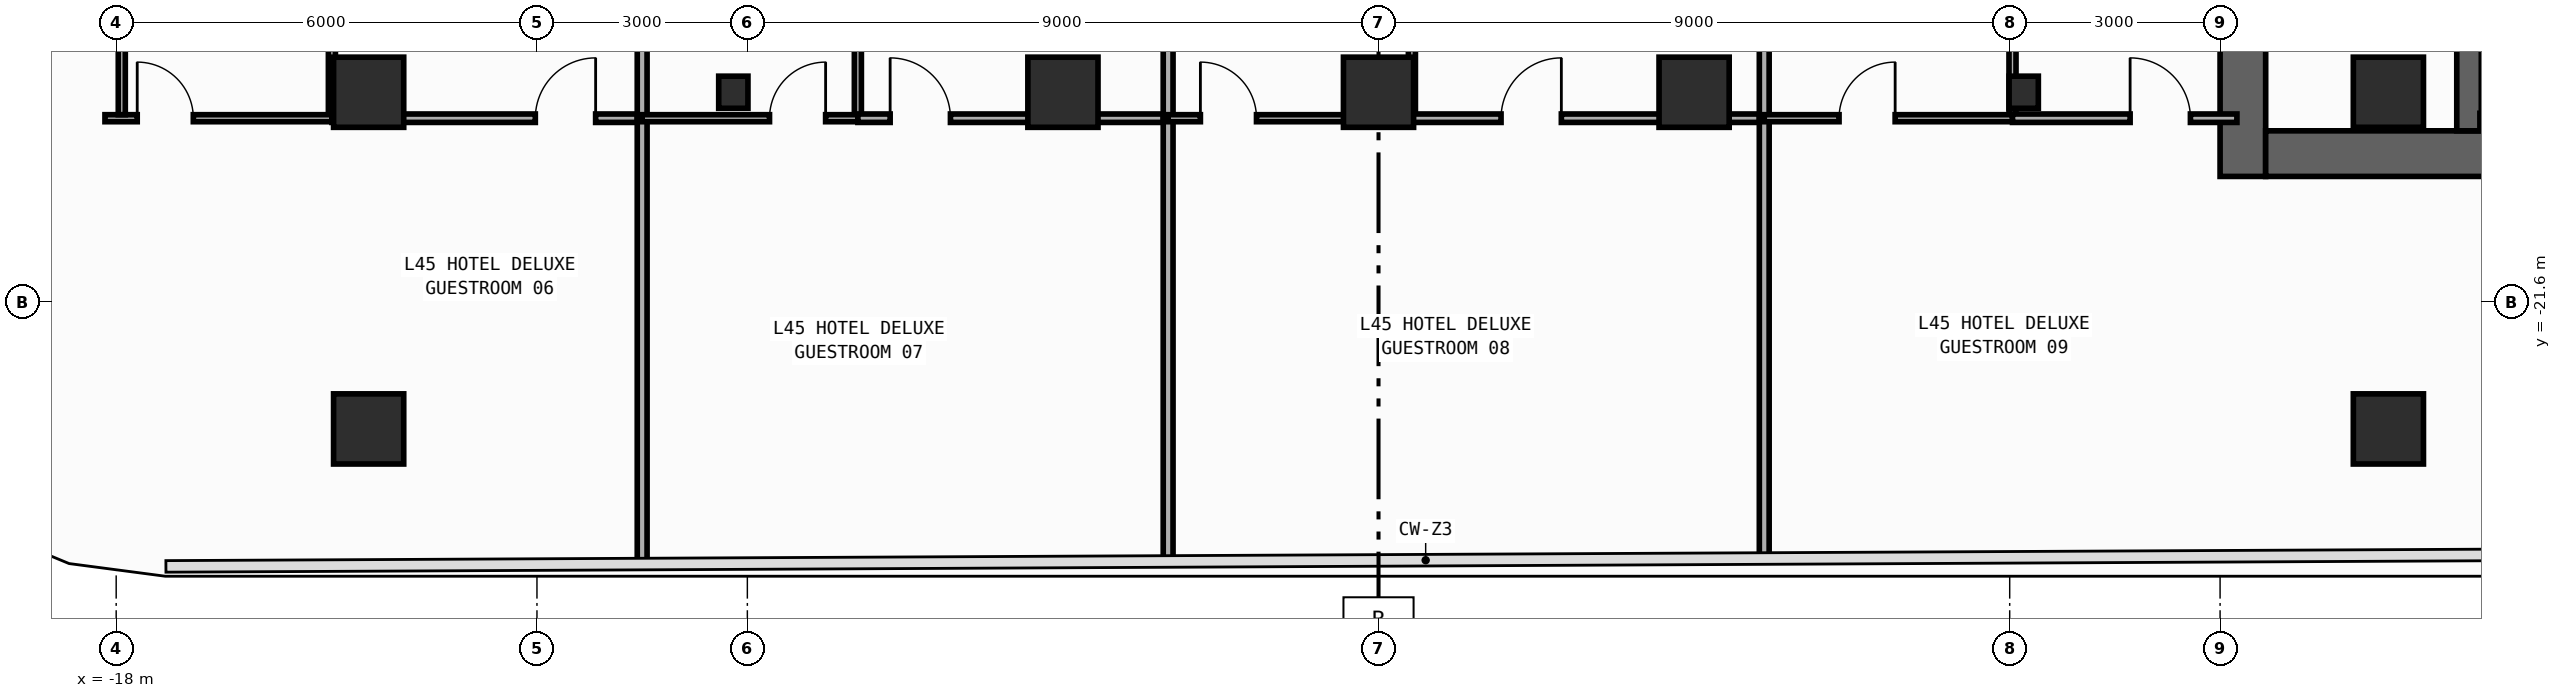
"""IFC4 building model, lengths in metres.
Left out: names, types, materials, properties, quantities, classifications, styles, units other than length and angle.
Written with IfcOpenShell. Run it as: python <this file> out.ifc"""

import sys

from ifc_helpers import new_model, si_unit, direction, frame, frame_2d, origin, origin_2d, place, context, subcontext, project, spatial, rectangle, i_section, extrude, element, fill, save


model = new_model("IFC4")
c1 = context("Model", 3, precision=1e-05, world=origin(), true_north=direction((0.0, 1.0)))
c2 = subcontext(c1, "Body", "Model", "MODEL_VIEW")
j1 = project(units=[si_unit("LENGTHUNIT", "METRE"), si_unit("PLANEANGLEUNIT", "RADIAN")], contexts=[c1])
p1 = place(None, origin())
s1 = spatial("IfcSite", under=j1, at=p1, CompositionType="ELEMENT")
p2 = place(p1, origin())
s2 = spatial("IfcBuilding", under=s1, at=p2, CompositionType="ELEMENT")
p3 = place(p2, frame((0.0, 0.0, 195.4)))
s3 = spatial("IfcBuildingStorey", under=s2, at=p3, CompositionType="ELEMENT", Elevation=195.4)
p4 = place(p3, frame((12.325, -19.8, 0.0), z_axis=(0.0, 0.0, 1.0), x_axis=(0.0, 1.0, 0.0)))
e1 = element("IfcWall", 1, at=p4, inside=s3, PredefinedType="SHEAR", context=c2, shape_type="SweptSolid", body=[
    extrude(rectangle(XDim=27.0, YDim=0.65, at=frame_2d((13.5, 0.0))), origin(), (0.0, 0.0, 1.0), 3.54),
])
p5 = place(p4, frame((23.05, 0.0, 0.0)))
e2 = element("IfcOpeningElement", 2, at=p5, cuts=e1, PredefinedType="OPENING", context=c2, shape_type="SweptSolid", body=[
    extrude(rectangle(XDim=1.1, YDim=2.2, at=frame_2d((0.55, 1.1))), frame((0.0, 0.335, 0.0), z_axis=(0.0, -1.0, 0.0), x_axis=(1.0, 0.0, 0.0)), (0.0, 0.0, 1.0), 0.67),
])
p6 = place(p4, frame((19.85, 0.0, 0.0)))
e3 = element("IfcOpeningElement", 3, at=p6, cuts=e1, PredefinedType="OPENING", context=c2, shape_type="SweptSolid", body=[
    extrude(rectangle(XDim=1.1, YDim=2.2, at=frame_2d((0.55, 1.1))), frame((0.0, 0.335, 0.0), z_axis=(0.0, -1.0, 0.0), x_axis=(1.0, 0.0, 0.0)), (0.0, 0.0, 1.0), 0.67),
])
p7 = place(p4, frame((16.65, 0.0, 0.0)))
e4 = element("IfcOpeningElement", 4, at=p7, cuts=e1, PredefinedType="OPENING", context=c2, shape_type="SweptSolid", body=[
    extrude(rectangle(XDim=1.1, YDim=2.2, at=frame_2d((0.55, 1.1))), frame((0.0, 0.335, 0.0), z_axis=(0.0, -1.0, 0.0), x_axis=(1.0, 0.0, 0.0)), (0.0, 0.0, 1.0), 0.67),
])
p8 = place(p4, frame((10.175, 0.0, 0.0)))
e5 = element("IfcOpeningElement", 5, at=p8, cuts=e1, PredefinedType="OPENING", context=c2, shape_type="SweptSolid", body=[
    extrude(rectangle(XDim=0.85, YDim=2.1, at=frame_2d((0.425, 1.05))), frame((0.0, 0.335, 0.0), z_axis=(0.0, -1.0, 0.0), x_axis=(1.0, 0.0, 0.0)), (0.0, 0.0, 1.0), 0.67),
])
p9 = place(p4, frame((12.725, 0.0, 0.0)))
e6 = element("IfcOpeningElement", 6, at=p9, cuts=e1, PredefinedType="OPENING", context=c2, shape_type="SweptSolid", body=[
    extrude(rectangle(XDim=1.15, YDim=2.2, at=frame_2d((0.575, 1.1))), frame((0.0, 0.335, 0.0), z_axis=(0.0, -1.0, 0.0), x_axis=(1.0, 0.0, 0.0)), (0.0, 0.0, 1.0), 0.67),
])
p10 = place(p4, frame((25.125, 0.0, 0.0)))
e7 = element("IfcOpeningElement", 7, at=p10, cuts=e1, PredefinedType="OPENING", context=c2, shape_type="SweptSolid", body=[
    extrude(rectangle(XDim=0.85, YDim=2.1, at=frame_2d((0.425, 1.05))), frame((0.0, 0.335, 0.0), z_axis=(0.0, -1.0, 0.0), x_axis=(1.0, 0.0, 0.0)), (0.0, 0.0, 1.0), 0.67),
])
p11 = place(p3, frame((12.65, -19.475, 0.0), z_axis=(0.0, 0.0, 1.0), x_axis=(1.0, 0.0, 0.0)))
e8 = element("IfcWall", 8, at=p11, inside=s3, PredefinedType="SHEAR", context=c2, shape_type="SweptSolid", body=[
    extrude(rectangle(XDim=7.1, YDim=0.65, at=frame_2d((3.55, 0.0))), origin(), (0.0, 0.0, 1.0), 3.54),
])
p12 = place(p3, frame((15.55, -19.15, 0.0), z_axis=(0.0, 0.0, 1.0), x_axis=(0.0, 1.0, 0.0)))
e9 = element("IfcWall", 9, at=p12, inside=s3, PredefinedType="SHEAR", context=c2, shape_type="SweptSolid", body=[
    extrude(rectangle(XDim=25.7, YDim=0.35, at=frame_2d((12.85, 0.0))), origin(), (0.0, 0.0, 1.0), 3.54),
])
p13 = place(p12, frame((12.075, 0.0, 0.0)))
e10 = element("IfcOpeningElement", 10, at=p13, cuts=e9, PredefinedType="OPENING", context=c2, shape_type="SweptSolid", body=[
    extrude(rectangle(XDim=1.15, YDim=2.2, at=frame_2d((0.575, 1.1))), frame((0.0, 0.185, 0.0), z_axis=(0.0, -1.0, 0.0), x_axis=(1.0, 0.0, 0.0)), (0.0, 0.0, 1.0), 0.37),
])
p14 = place(p12, frame((24.475, 0.0, 0.0)))
e11 = element("IfcOpeningElement", 11, at=p14, cuts=e9, PredefinedType="OPENING", context=c2, shape_type="SweptSolid", body=[
    extrude(rectangle(XDim=0.85, YDim=2.1, at=frame_2d((0.425, 1.05))), frame((0.0, 0.185, 0.0), z_axis=(0.0, -1.0, 0.0), x_axis=(1.0, 0.0, 0.0)), (0.0, 0.0, 1.0), 0.37),
])
p15 = place(p3, frame((15.705, -19.01, 0.0), z_axis=(0.0, 0.0, 1.0), x_axis=(1.0, 0.0, 0.0)))
e12 = element("IfcWall", 12, at=p15, inside=s3, PredefinedType="SHEAR", context=c2, shape_type="SweptSolid", body=[
    extrude(rectangle(XDim=4.065, YDim=0.22, at=frame_2d((2.032, 0.0))), origin(), (0.0, 0.0, 1.0), 3.54),
])
for number, where, z_axis, x_axis in (
    (13, (-9.2, -18.6, 0.0), (0.0, 0.0, 1.0), (1.0, 0.0, 0.0)),
    (14, (9.2, -18.6, 0.0), (0.0, 0.0, 1.0), (1.0, 0.0, 0.0)),
):
    element("IfcColumn", number, at=place(p3, frame(where, z_axis=z_axis, x_axis=x_axis)), inside=s3, PredefinedType="COLUMN", context=c2, shape_type="SweptSolid", body=[
        extrude(i_section(OverallWidth=0.417, OverallDepth=0.458, WebThickness=0.03, FlangeThickness=0.05, FilletRadius=0.022, at=origin_2d()), origin(), (0.0, 0.0, 1.0), 3.8),
    ])
for number, where, z_axis, x_axis in (
    (15, (-14.4, -18.6, 0.0), (0.0, 0.0, 1.0), (1.0, 0.0, 0.0)),
    (16, (14.4, -18.6, 0.0), (0.0, 0.0, 1.0), (1.0, 0.0, 0.0)),
    (17, (-4.5, -18.6, 0.0), (0.0, 0.0, 1.0), (1.0, 0.0, 0.0)),
    (18, (0.0, -18.6, 0.0), (0.0, 0.0, 1.0), (1.0, 0.0, 0.0)),
    (19, (4.5, -18.6, 0.0), (0.0, 0.0, 1.0), (1.0, 0.0, 0.0)),
    (20, (-14.4, -23.4, 0.0), (0.0, 0.0, 1.0), (1.0, 0.0, 0.0)),
    (21, (14.4, -23.4, 0.0), (0.0, 0.0, 1.0), (1.0, 0.0, 0.0)),
):
    element("IfcColumn", number, at=place(p3, frame(where, z_axis=z_axis, x_axis=x_axis)), inside=s3, PredefinedType="COLUMN", context=c2, shape_type="SweptSolid", body=[
        extrude(rectangle(XDim=1.0, YDim=1.0, at=origin_2d()), origin(), (0.0, 0.0, 1.0), 3.8),
    ])
p16 = place(p3, frame((-14.924, -18.92, 0.0), z_axis=(0.0, 0.0, 1.0), x_axis=(0.0, 1.0, 0.0)))
e22 = element("IfcWall", 22, at=p16, inside=s3, PredefinedType="PARTITIONING", context=c2, shape_type="SweptSolid", body=[
    extrude(rectangle(XDim=2.965, YDim=0.1, at=frame_2d((1.482, 0.0))), origin(), (0.0, 0.0, 1.0), 3.54),
])
p17 = place(p16, frame((1.705, 0.0, 0.0)))
e23 = element("IfcOpeningElement", 23, at=p17, cuts=e22, PredefinedType="OPENING", context=c2, shape_type="SweptSolid", body=[
    extrude(rectangle(XDim=0.8, YDim=2.1, at=frame_2d((0.4, 1.05))), frame((0.0, 0.06, 0.0), z_axis=(0.0, -1.0, 0.0), x_axis=(1.0, 0.0, 0.0)), (0.0, 0.0, 1.0), 0.12),
])
p18 = place(p3, frame((-18.16, -18.97, 0.0), z_axis=(0.0, 0.0, 1.0), x_axis=(1.0, 0.0, 0.0)))
e24 = element("IfcWall", 24, at=p18, inside=s3, PredefinedType="PARTITIONING", context=c2, shape_type="SweptSolid", body=[
    extrude(rectangle(XDim=3.236, YDim=0.1, at=frame_2d((1.618, 0.0))), origin(), (0.0, 0.0, 1.0), 3.54),
])
p19 = place(p18, frame((0.46, 0.0, 0.0)))
e25 = element("IfcOpeningElement", 25, at=p19, cuts=e24, PredefinedType="OPENING", context=c2, shape_type="SweptSolid", body=[
    extrude(rectangle(XDim=0.8, YDim=2.1, at=frame_2d((0.4, 1.05))), frame((0.0, 0.06, 0.0), z_axis=(0.0, -1.0, 0.0), x_axis=(1.0, 0.0, 0.0)), (0.0, 0.0, 1.0), 0.12),
])
p20 = place(p3, frame((-14.924, -18.97, 0.0), z_axis=(0.0, 0.0, 1.0), x_axis=(1.0, 0.0, 0.0)))
e26 = element("IfcWall", 26, at=p20, inside=s3, PredefinedType="PARTITIONING", context=c2, shape_type="SweptSolid", body=[
    extrude(rectangle(XDim=4.424, YDim=0.12, at=frame_2d((2.212, 0.0))), origin(), (0.0, 0.0, 1.0), 3.54),
])
p21 = place(p20, frame((2.901, 0.0, 0.0)))
e27 = element("IfcOpeningElement", 27, at=p21, cuts=e26, PredefinedType="OPENING", context=c2, shape_type="SweptSolid", body=[
    extrude(rectangle(XDim=0.86, YDim=2.15, at=frame_2d((0.43, 1.075))), frame((0.0, 0.07, 0.0), z_axis=(0.0, -1.0, 0.0), x_axis=(1.0, 0.0, 0.0)), (0.0, 0.0, 1.0), 0.14),
])
p22 = place(p3, frame((-10.5, -18.97, 0.0), z_axis=(0.0, 0.0, 1.0), x_axis=(0.0, 1.0, 0.0)))
e28 = element("IfcWall", 28, at=p22, inside=s3, PredefinedType="PARTITIONING", context=c2, shape_type="SweptSolid", body=[
    extrude(rectangle(XDim=3.015, YDim=0.14, at=frame_2d((1.507, 0.0))), origin(), (0.0, 0.0, 1.0), 3.54),
])
p23 = place(p3, frame((-10.5, -25.322, 0.0), z_axis=(0.0, 0.0, 1.0), x_axis=(0.0, 1.0, 0.0)))
e29 = element("IfcWall", 29, at=p23, inside=s3, PredefinedType="PARTITIONING", context=c2, shape_type="SweptSolid", body=[
    extrude(rectangle(XDim=6.352, YDim=0.14, at=frame_2d((3.176, 0.0))), origin(), (0.0, 0.0, 1.0), 3.54),
])
p24 = place(p3, frame((-7.424, -18.92, 0.0), z_axis=(0.0, 0.0, 1.0), x_axis=(0.0, 1.0, 0.0)))
e30 = element("IfcWall", 30, at=p24, inside=s3, PredefinedType="PARTITIONING", context=c2, shape_type="SweptSolid", body=[
    extrude(rectangle(XDim=2.965, YDim=0.1, at=frame_2d((1.482, 0.0))), origin(), (0.0, 0.0, 1.0), 3.54),
])
p25 = place(p24, frame((1.705, 0.0, 0.0)))
e31 = element("IfcOpeningElement", 31, at=p25, cuts=e30, PredefinedType="OPENING", context=c2, shape_type="SweptSolid", body=[
    extrude(rectangle(XDim=0.8, YDim=2.1, at=frame_2d((0.4, 1.05))), frame((0.0, 0.06, 0.0), z_axis=(0.0, -1.0, 0.0), x_axis=(1.0, 0.0, 0.0)), (0.0, 0.0, 1.0), 0.12),
])
p26 = place(p3, frame((-10.5, -18.97, 0.0), z_axis=(0.0, 0.0, 1.0), x_axis=(1.0, 0.0, 0.0)))
e32 = element("IfcWall", 32, at=p26, inside=s3, PredefinedType="PARTITIONING", context=c2, shape_type="SweptSolid", body=[
    extrude(rectangle(XDim=3.076, YDim=0.1, at=frame_2d((1.538, 0.0))), origin(), (0.0, 0.0, 1.0), 3.54),
])
p27 = place(p26, frame((1.816, 0.0, 0.0)))
e33 = element("IfcOpeningElement", 33, at=p27, cuts=e32, PredefinedType="OPENING", context=c2, shape_type="SweptSolid", body=[
    extrude(rectangle(XDim=0.8, YDim=2.1, at=frame_2d((0.4, 1.05))), frame((0.0, 0.06, 0.0), z_axis=(0.0, -1.0, 0.0), x_axis=(1.0, 0.0, 0.0)), (0.0, 0.0, 1.0), 0.12),
])
p28 = place(p3, frame((-7.424, -18.97, 0.0), z_axis=(0.0, 0.0, 1.0), x_axis=(1.0, 0.0, 0.0)))
e34 = element("IfcWall", 34, at=p28, inside=s3, PredefinedType="PARTITIONING", context=c2, shape_type="SweptSolid", body=[
    extrude(rectangle(XDim=4.424, YDim=0.12, at=frame_2d((2.212, 0.0))), origin(), (0.0, 0.0, 1.0), 3.54),
])
p29 = place(p28, frame((0.46, 0.0, 0.0)))
e35 = element("IfcOpeningElement", 35, at=p29, cuts=e34, PredefinedType="OPENING", context=c2, shape_type="SweptSolid", body=[
    extrude(rectangle(XDim=0.86, YDim=2.15, at=frame_2d((0.43, 1.075))), frame((0.0, 0.07, 0.0), z_axis=(0.0, -1.0, 0.0), x_axis=(1.0, 0.0, 0.0)), (0.0, 0.0, 1.0), 0.14),
])
p30 = place(p3, frame((-3.0, -18.97, 0.0), z_axis=(0.0, 0.0, 1.0), x_axis=(0.0, 1.0, 0.0)))
e36 = element("IfcWall", 36, at=p30, inside=s3, PredefinedType="PARTITIONING", context=c2, shape_type="SweptSolid", body=[
    extrude(rectangle(XDim=3.015, YDim=0.14, at=frame_2d((1.507, 0.0))), origin(), (0.0, 0.0, 1.0), 3.54),
])
p31 = place(p3, frame((-3.0, -25.285, 0.0), z_axis=(0.0, 0.0, 1.0), x_axis=(0.0, 1.0, 0.0)))
e37 = element("IfcWall", 37, at=p31, inside=s3, PredefinedType="PARTITIONING", context=c2, shape_type="SweptSolid", body=[
    extrude(rectangle(XDim=6.315, YDim=0.14, at=frame_2d((3.157, 0.0))), origin(), (0.0, 0.0, 1.0), 3.54),
])
p32 = place(p3, frame((0.476, -18.92, 0.0), z_axis=(0.0, 0.0, 1.0), x_axis=(0.0, 1.0, 0.0)))
e38 = element("IfcWall", 38, at=p32, inside=s3, PredefinedType="PARTITIONING", context=c2, shape_type="SweptSolid", body=[
    extrude(rectangle(XDim=2.965, YDim=0.1, at=frame_2d((1.482, 0.0))), origin(), (0.0, 0.0, 1.0), 3.54),
])
p33 = place(p32, frame((1.705, 0.0, 0.0)))
e39 = element("IfcOpeningElement", 39, at=p33, cuts=e38, PredefinedType="OPENING", context=c2, shape_type="SweptSolid", body=[
    extrude(rectangle(XDim=0.8, YDim=2.1, at=frame_2d((0.4, 1.05))), frame((0.0, 0.06, 0.0), z_axis=(0.0, -1.0, 0.0), x_axis=(1.0, 0.0, 0.0)), (0.0, 0.0, 1.0), 0.12),
])
p34 = place(p3, frame((-3.0, -18.97, 0.0), z_axis=(0.0, 0.0, 1.0), x_axis=(1.0, 0.0, 0.0)))
e40 = element("IfcWall", 40, at=p34, inside=s3, PredefinedType="PARTITIONING", context=c2, shape_type="SweptSolid", body=[
    extrude(rectangle(XDim=3.476, YDim=0.1, at=frame_2d((1.738, 0.0))), origin(), (0.0, 0.0, 1.0), 3.54),
])
p35 = place(p34, frame((0.46, 0.0, 0.0)))
e41 = element("IfcOpeningElement", 41, at=p35, cuts=e40, PredefinedType="OPENING", context=c2, shape_type="SweptSolid", body=[
    extrude(rectangle(XDim=0.8, YDim=2.1, at=frame_2d((0.4, 1.05))), frame((0.0, 0.06, 0.0), z_axis=(0.0, -1.0, 0.0), x_axis=(1.0, 0.0, 0.0)), (0.0, 0.0, 1.0), 0.12),
])
p36 = place(p3, frame((0.476, -18.97, 0.0), z_axis=(0.0, 0.0, 1.0), x_axis=(1.0, 0.0, 0.0)))
e42 = element("IfcWall", 42, at=p36, inside=s3, PredefinedType="PARTITIONING", context=c2, shape_type="SweptSolid", body=[
    extrude(rectangle(XDim=5.024, YDim=0.12, at=frame_2d((2.512, 0.0))), origin(), (0.0, 0.0, 1.0), 3.54),
])
p37 = place(p36, frame((1.271, 0.0, 0.0)))
e43 = element("IfcOpeningElement", 43, at=p37, cuts=e42, PredefinedType="OPENING", context=c2, shape_type="SweptSolid", body=[
    extrude(rectangle(XDim=0.86, YDim=2.15, at=frame_2d((0.43, 1.075))), frame((0.0, 0.07, 0.0), z_axis=(0.0, -1.0, 0.0), x_axis=(1.0, 0.0, 0.0)), (0.0, 0.0, 1.0), 0.14),
])
p38 = place(p3, frame((5.5, -18.97, 0.0), z_axis=(0.0, 0.0, 1.0), x_axis=(0.0, 1.0, 0.0)))
e44 = element("IfcWall", 44, at=p38, inside=s3, PredefinedType="PARTITIONING", context=c2, shape_type="SweptSolid", body=[
    extrude(rectangle(XDim=3.015, YDim=0.14, at=frame_2d((1.507, 0.0))), origin(), (0.0, 0.0, 1.0), 3.54),
])
p39 = place(p3, frame((5.5, -25.243, 0.0), z_axis=(0.0, 0.0, 1.0), x_axis=(0.0, 1.0, 0.0)))
e45 = element("IfcWall", 45, at=p39, inside=s3, PredefinedType="PARTITIONING", context=c2, shape_type="SweptSolid", body=[
    extrude(rectangle(XDim=6.273, YDim=0.14, at=frame_2d((3.136, 0.0))), origin(), (0.0, 0.0, 1.0), 3.54),
])
p40 = place(p3, frame((9.04, -18.92, 0.0), z_axis=(0.0, 0.0, 1.0), x_axis=(0.0, 1.0, 0.0)))
e46 = element("IfcWall", 46, at=p40, inside=s3, PredefinedType="PARTITIONING", context=c2, shape_type="SweptSolid", body=[
    extrude(rectangle(XDim=2.965, YDim=0.1, at=frame_2d((1.482, 0.0))), origin(), (0.0, 0.0, 1.0), 2.952),
])
p41 = place(p40, frame((1.705, 0.0, 0.0)))
e47 = element("IfcOpeningElement", 47, at=p41, cuts=e46, PredefinedType="OPENING", context=c2, shape_type="SweptSolid", body=[
    extrude(rectangle(XDim=0.8, YDim=2.1, at=frame_2d((0.4, 1.05))), frame((0.0, 0.06, 0.0), z_axis=(0.0, -1.0, 0.0), x_axis=(1.0, 0.0, 0.0)), (0.0, 0.0, 1.0), 0.12),
])
p42 = place(p3, frame((5.5, -18.97, 0.0), z_axis=(0.0, 0.0, 1.0), x_axis=(1.0, 0.0, 0.0)))
e48 = element("IfcWall", 48, at=p42, inside=s3, PredefinedType="PARTITIONING", context=c2, shape_type="SweptSolid", body=[
    extrude(rectangle(XDim=3.54, YDim=0.1, at=frame_2d((1.77, 0.0))), origin(), (0.0, 0.0, 1.0), 3.54),
])
p43 = place(p42, frame((1.067, 0.0, 0.0)))
e49 = element("IfcOpeningElement", 49, at=p43, cuts=e48, PredefinedType="OPENING", context=c2, shape_type="SweptSolid", body=[
    extrude(rectangle(XDim=0.8, YDim=2.1, at=frame_2d((0.4, 1.05))), frame((0.0, 0.06, 0.0), z_axis=(0.0, -1.0, 0.0), x_axis=(1.0, 0.0, 0.0)), (0.0, 0.0, 1.0), 0.12),
])
p44 = place(p3, frame((9.04, -18.97, 0.0), z_axis=(0.0, 0.0, 1.0), x_axis=(1.0, 0.0, 0.0)))
e50 = element("IfcWall", 50, at=p44, inside=s3, PredefinedType="PARTITIONING", context=c2, shape_type="SweptSolid", body=[
    extrude(rectangle(XDim=3.2, YDim=0.12, at=frame_2d((1.6, 0.0))), origin(), (0.0, 0.0, 1.0), 3.54),
])
p45 = place(p44, frame((1.677, 0.0, 0.0)))
e51 = element("IfcOpeningElement", 51, at=p45, cuts=e50, PredefinedType="OPENING", context=c2, shape_type="SweptSolid", body=[
    extrude(rectangle(XDim=0.86, YDim=2.15, at=frame_2d((0.43, 1.075))), frame((0.0, 0.07, 0.0), z_axis=(0.0, -1.0, 0.0), x_axis=(1.0, 0.0, 0.0)), (0.0, 0.0, 1.0), 0.14),
])
p46 = place(p3, frame((-17.92, -18.92, 0.0), z_axis=(0.0, 0.0, 1.0), x_axis=(0.0, 1.0, 0.0)))
e52 = element("IfcWall", 52, at=p46, inside=s3, PredefinedType="PARTITIONING", context=c2, shape_type="SweptSolid", body=[
    extrude(rectangle(XDim=2.965, YDim=0.1, at=frame_2d((1.482, 0.0))), origin(), (0.0, 0.0, 1.0), 3.54),
])
p47 = place(p19, origin())
e53 = element("IfcDoor", 53, at=p47, inside=s3, OperationType="SINGLE_SWING_LEFT", PredefinedType="DOOR", context=c2, shape_type="SweptSolid", body=[
    extrude(rectangle(XDim=0.8, YDim=2.1, at=frame_2d((0.4, 1.05))), frame((0.0, 0.025, 0.0), z_axis=(0.0, -1.0, 0.0), x_axis=(1.0, 0.0, 0.0)), (0.0, 0.0, 1.0), 0.05),
])
fill(e25, e53)
p48 = place(p21, origin())
e54 = element("IfcDoor", 54, at=p48, inside=s3, OperationType="SINGLE_SWING_RIGHT", PredefinedType="DOOR", context=c2, shape_type="SweptSolid", body=[
    extrude(rectangle(XDim=0.86, YDim=2.15, at=frame_2d((0.43, 1.075))), frame((0.0, 0.025, 0.0), z_axis=(0.0, -1.0, 0.0), x_axis=(1.0, 0.0, 0.0)), (0.0, 0.0, 1.0), 0.05),
])
fill(e27, e54)
p49 = place(p27, origin())
e55 = element("IfcDoor", 55, at=p49, inside=s3, OperationType="SINGLE_SWING_RIGHT", PredefinedType="DOOR", context=c2, shape_type="SweptSolid", body=[
    extrude(rectangle(XDim=0.8, YDim=2.1, at=frame_2d((0.4, 1.05))), frame((0.0, 0.025, 0.0), z_axis=(0.0, -1.0, 0.0), x_axis=(1.0, 0.0, 0.0)), (0.0, 0.0, 1.0), 0.05),
])
fill(e33, e55)
p50 = place(p29, origin())
e56 = element("IfcDoor", 56, at=p50, inside=s3, OperationType="SINGLE_SWING_LEFT", PredefinedType="DOOR", context=c2, shape_type="SweptSolid", body=[
    extrude(rectangle(XDim=0.86, YDim=2.15, at=frame_2d((0.43, 1.075))), frame((0.0, 0.025, 0.0), z_axis=(0.0, -1.0, 0.0), x_axis=(1.0, 0.0, 0.0)), (0.0, 0.0, 1.0), 0.05),
])
fill(e35, e56)
p51 = place(p35, origin())
e57 = element("IfcDoor", 57, at=p51, inside=s3, OperationType="SINGLE_SWING_LEFT", PredefinedType="DOOR", context=c2, shape_type="SweptSolid", body=[
    extrude(rectangle(XDim=0.8, YDim=2.1, at=frame_2d((0.4, 1.05))), frame((0.0, 0.025, 0.0), z_axis=(0.0, -1.0, 0.0), x_axis=(1.0, 0.0, 0.0)), (0.0, 0.0, 1.0), 0.05),
])
fill(e41, e57)
p52 = place(p37, origin())
e58 = element("IfcDoor", 58, at=p52, inside=s3, OperationType="SINGLE_SWING_RIGHT", PredefinedType="DOOR", context=c2, shape_type="SweptSolid", body=[
    extrude(rectangle(XDim=0.86, YDim=2.15, at=frame_2d((0.43, 1.075))), frame((0.0, 0.025, 0.0), z_axis=(0.0, -1.0, 0.0), x_axis=(1.0, 0.0, 0.0)), (0.0, 0.0, 1.0), 0.05),
])
fill(e43, e58)
p53 = place(p43, origin())
e59 = element("IfcDoor", 59, at=p53, inside=s3, OperationType="SINGLE_SWING_RIGHT", PredefinedType="DOOR", context=c2, shape_type="SweptSolid", body=[
    extrude(rectangle(XDim=0.8, YDim=2.1, at=frame_2d((0.4, 1.05))), frame((0.0, 0.025, 0.0), z_axis=(0.0, -1.0, 0.0), x_axis=(1.0, 0.0, 0.0)), (0.0, 0.0, 1.0), 0.05),
])
fill(e49, e59)
p54 = place(p45, origin())
e60 = element("IfcDoor", 60, at=p54, inside=s3, OperationType="SINGLE_SWING_LEFT", PredefinedType="DOOR", context=c2, shape_type="SweptSolid", body=[
    extrude(rectangle(XDim=0.86, YDim=2.15, at=frame_2d((0.43, 1.075))), frame((0.0, 0.025, 0.0), z_axis=(0.0, -1.0, 0.0), x_axis=(1.0, 0.0, 0.0)), (0.0, 0.0, 1.0), 0.05),
])
fill(e51, e60)
save(model, sys.argv[1])
